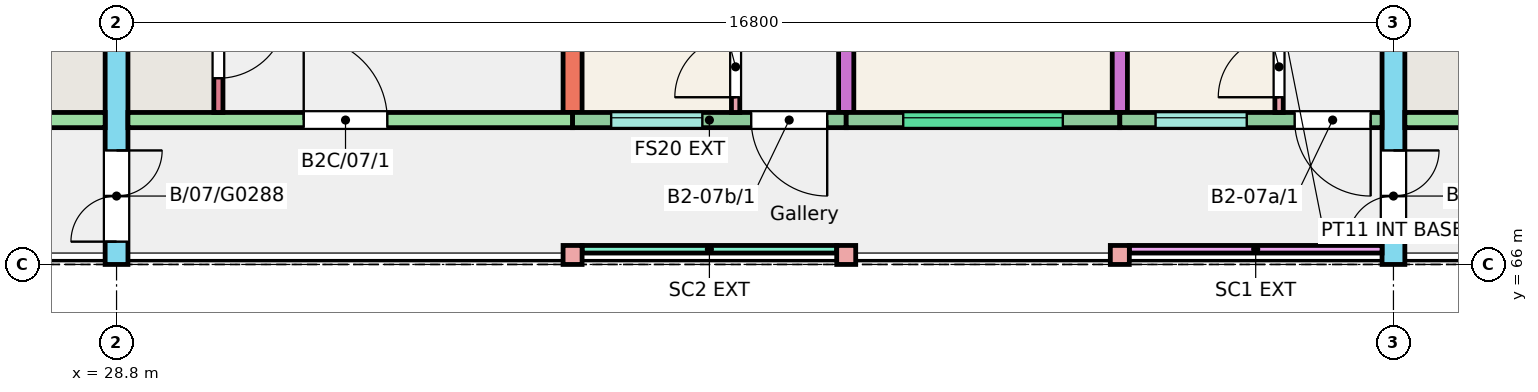
"""IFC4 building model, lengths in metres.
Left out: names, types, materials, properties, quantities, classifications, styles, units other than length and angle.
Written with IfcOpenShell. Run it as: python <this file> out.ifc"""

import sys

from ifc_helpers import new_model, si_unit, direction, frame, frame_2d, origin, origin_2d, place, context, subcontext, project, spatial, rectangle, extrude, element, fill, save


model = new_model("IFC4")
c1 = context("Model", 3, precision=1e-05, world=origin(), true_north=direction((0.0, 1.0)))
c2 = subcontext(c1, "Body", "Model", "MODEL_VIEW")
j1 = project(units=[si_unit("LENGTHUNIT", "METRE"), si_unit("PLANEANGLEUNIT", "RADIAN")], contexts=[c1])
p1 = place(None, origin())
s1 = spatial("IfcSite", under=j1, at=p1, CompositionType="ELEMENT")
p2 = place(p1, origin())
s2 = spatial("IfcBuilding", under=s1, at=p2, CompositionType="ELEMENT")
p3 = place(p2, frame((0.0, 0.0, 21.0)))
s3 = spatial("IfcBuildingStorey", under=s2, at=p3, CompositionType="ELEMENT", Elevation=21.0)
p4 = place(p3, frame((28.8, 66.0, 0.0), z_axis=(0.0, 0.0, 1.0), x_axis=(0.0, 1.0, 0.0)))
e1 = element("IfcWall", 1, at=p4, inside=s3, PredefinedType="SHEAR", context=c2, shape_type="SweptSolid", body=[
    extrude(rectangle(XDim=11.0, YDim=0.3, at=frame_2d((5.5, 0.0))), origin(), (0.0, 0.0, 1.0), 3.0),
])
p5 = place(p4, frame((0.3, 0.0, 0.0)))
e2 = element("IfcOpeningElement", 2, at=p5, cuts=e1, PredefinedType="OPENING", context=c2, shape_type="SweptSolid", body=[
    extrude(rectangle(XDim=1.2, YDim=2.1, at=frame_2d((0.6, 1.05))), frame((0.0, 0.16, 0.0), z_axis=(0.0, -1.0, 0.0), x_axis=(1.0, 0.0, 0.0)), (0.0, 0.0, 1.0), 0.32),
])
p6 = place(p3, frame((34.8, 68.0, 0.0), z_axis=(0.0, 0.0, 1.0), x_axis=(0.0, 1.0, 0.0)))
e3 = element("IfcWall", 3, at=p6, inside=s3, PredefinedType="SHEAR", context=c2, shape_type="SweptSolid", body=[
    extrude(rectangle(XDim=9.0, YDim=0.25, at=frame_2d((4.5, 0.0))), origin(), (0.0, 0.0, 1.0), 3.0),
])
p7 = place(p3, frame((38.4, 68.0, 0.0), z_axis=(0.0, 0.0, 1.0), x_axis=(0.0, 1.0, 0.0)))
e4 = element("IfcWall", 4, at=p7, inside=s3, PredefinedType="SHEAR", context=c2, shape_type="SweptSolid", body=[
    extrude(rectangle(XDim=9.0, YDim=0.2, at=frame_2d((4.5, 0.0))), origin(), (0.0, 0.0, 1.0), 3.0),
])
p8 = place(p7, frame((2.4, 0.0, 0.0)))
e5 = element("IfcOpeningElement", 5, at=p8, cuts=e4, PredefinedType="OPENING", context=c2, shape_type="SweptSolid", body=[
    extrude(rectangle(XDim=1.2, YDim=2.1, at=frame_2d((0.6, 1.05))), frame((0.0, 0.11, 0.0), z_axis=(0.0, -1.0, 0.0), x_axis=(1.0, 0.0, 0.0)), (0.0, 0.0, 1.0), 0.22),
])
p9 = place(p7, frame((6.4, 0.0, 0.0)))
e6 = element("IfcOpeningElement", 6, at=p9, cuts=e4, PredefinedType="OPENING", context=c2, shape_type="SweptSolid", body=[
    extrude(rectangle(XDim=1.2, YDim=2.1, at=frame_2d((0.6, 1.05))), frame((0.0, 0.11, 0.0), z_axis=(0.0, -1.0, 0.0), x_axis=(1.0, 0.0, 0.0)), (0.0, 0.0, 1.0), 0.22),
])
p10 = place(p3, frame((42.0, 68.0, 0.0), z_axis=(0.0, 0.0, 1.0), x_axis=(0.0, 1.0, 0.0)))
e7 = element("IfcWall", 7, at=p10, inside=s3, PredefinedType="SHEAR", context=c2, shape_type="SweptSolid", body=[
    extrude(rectangle(XDim=9.0, YDim=0.2, at=frame_2d((4.5, 0.0))), origin(), (0.0, 0.0, 1.0), 3.0),
])
p11 = place(p3, frame((45.6, 66.0, 0.0), z_axis=(0.0, 0.0, 1.0), x_axis=(0.0, 1.0, 0.0)))
e8 = element("IfcWall", 8, at=p11, inside=s3, PredefinedType="SHEAR", context=c2, shape_type="SweptSolid", body=[
    extrude(rectangle(XDim=11.0, YDim=0.3, at=frame_2d((5.5, 0.0))), origin(), (0.0, 0.0, 1.0), 3.0),
])
p12 = place(p11, frame((0.3, 0.0, 0.0)))
e9 = element("IfcOpeningElement", 9, at=p12, cuts=e8, PredefinedType="OPENING", context=c2, shape_type="SweptSolid", body=[
    extrude(rectangle(XDim=1.2, YDim=2.1, at=frame_2d((0.6, 1.05))), frame((0.0, 0.16, 0.0), z_axis=(0.0, -1.0, 0.0), x_axis=(1.0, 0.0, 0.0)), (0.0, 0.0, 1.0), 0.32),
])
p13 = place(p3, frame((22.8, 67.9, 0.0), z_axis=(0.0, 0.0, 1.0), x_axis=(1.0, 0.0, 0.0)))
e10 = element("IfcWall", 10, at=p13, inside=s3, PredefinedType="SHEAR", context=c2, shape_type="SweptSolid", body=[
    extrude(rectangle(XDim=5.85, YDim=0.2, at=frame_2d((2.925, 0.0))), origin(), (0.0, 0.0, 1.0), 3.0),
])
p14 = place(p13, frame((2.438, 0.0, 0.0)))
e11 = element("IfcOpeningElement", 11, at=p14, cuts=e10, PredefinedType="OPENING", context=c2, shape_type="SweptSolid", body=[
    extrude(rectangle(XDim=1.1, YDim=2.1, at=frame_2d((0.55, 1.05))), frame((0.0, 0.11, 0.0), z_axis=(0.0, -1.0, 0.0), x_axis=(1.0, 0.0, 0.0)), (0.0, 0.0, 1.0), 0.22),
])
p15 = place(p3, frame((28.95, 67.9, 0.0), z_axis=(0.0, 0.0, 1.0), x_axis=(1.0, 0.0, 0.0)))
e12 = element("IfcWall", 12, at=p15, inside=s3, PredefinedType="SHEAR", context=c2, shape_type="SweptSolid", body=[
    extrude(rectangle(XDim=5.85, YDim=0.2, at=frame_2d((2.925, 0.0))), origin(), (0.0, 0.0, 1.0), 3.0),
])
p16 = place(p15, frame((2.312, 0.0, 0.0)))
e13 = element("IfcOpeningElement", 13, at=p16, cuts=e12, PredefinedType="OPENING", context=c2, shape_type="SweptSolid", body=[
    extrude(rectangle(XDim=1.1, YDim=2.1, at=frame_2d((0.55, 1.05))), frame((0.0, 0.11, 0.0), z_axis=(0.0, -1.0, 0.0), x_axis=(1.0, 0.0, 0.0)), (0.0, 0.0, 1.0), 0.22),
])
p17 = place(p3, frame((30.14, 68.0, 0.0), z_axis=(0.0, 0.0, 1.0), x_axis=(0.0, 1.0, 0.0)))
e14 = element("IfcWall", 14, at=p17, inside=s3, PredefinedType="SHEAR", context=c2, shape_type="SweptSolid", body=[
    extrude(rectangle(XDim=1.72, YDim=0.12, at=frame_2d((0.86, 0.0))), origin(), (0.0, 0.0, 1.0), 3.0),
])
p18 = place(p17, frame((0.45, 0.0, 0.0)))
e15 = element("IfcOpeningElement", 15, at=p18, cuts=e14, PredefinedType="OPENING", context=c2, shape_type="SweptSolid", body=[
    extrude(rectangle(XDim=0.9, YDim=2.1, at=frame_2d((0.45, 1.05))), frame((0.0, 0.07, 0.0), z_axis=(0.0, -1.0, 0.0), x_axis=(1.0, 0.0, 0.0)), (0.0, 0.0, 1.0), 0.14),
])
p19 = place(p3, frame((34.8, 67.9, 0.0), z_axis=(0.0, 0.0, 1.0), x_axis=(1.0, 0.0, 0.0)))
e16 = element("IfcWall", 16, at=p19, inside=s3, PredefinedType="SOLIDWALL", context=c2, shape_type="SweptSolid", body=[
    extrude(rectangle(XDim=3.6, YDim=0.2, at=frame_2d((1.8, 0.0))), origin(), (0.0, 0.0, 1.0), 3.0),
])
p20 = place(p19, frame((0.508, 0.0, 1.1)))
e17 = element("IfcOpeningElement", 17, at=p20, cuts=e16, PredefinedType="OPENING", context=c2, shape_type="SweptSolid", body=[
    extrude(rectangle(XDim=1.2, YDim=1.3, at=frame_2d((0.6, 0.65))), frame((0.0, 0.11, 0.0), z_axis=(0.0, -1.0, 0.0), x_axis=(1.0, 0.0, 0.0)), (0.0, 0.0, 1.0), 0.22),
])
p21 = place(p19, frame((2.35, 0.0, 0.0)))
e18 = element("IfcOpeningElement", 18, at=p21, cuts=e16, PredefinedType="OPENING", context=c2, shape_type="SweptSolid", body=[
    extrude(rectangle(XDim=1.0, YDim=2.1, at=frame_2d((0.5, 1.05))), frame((0.0, 0.11, 0.0), z_axis=(0.0, -1.0, 0.0), x_axis=(1.0, 0.0, 0.0)), (0.0, 0.0, 1.0), 0.22),
])
p22 = place(p3, frame((38.4, 67.9, 0.0), z_axis=(0.0, 0.0, 1.0), x_axis=(1.0, 0.0, 0.0)))
e19 = element("IfcWall", 19, at=p22, inside=s3, PredefinedType="SOLIDWALL", context=c2, shape_type="SweptSolid", body=[
    extrude(rectangle(XDim=3.6, YDim=0.2, at=frame_2d((1.8, 0.0))), origin(), (0.0, 0.0, 1.0), 3.0),
])
p23 = place(p22, frame((0.75, 0.0, 1.2)))
e20 = element("IfcOpeningElement", 20, at=p23, cuts=e19, PredefinedType="OPENING", context=c2, shape_type="SweptSolid", body=[
    extrude(rectangle(XDim=2.1, YDim=1.2, at=frame_2d((1.05, 0.6))), frame((0.0, 0.11, 0.0), z_axis=(0.0, -1.0, 0.0), x_axis=(1.0, 0.0, 0.0)), (0.0, 0.0, 1.0), 0.22),
])
p24 = place(p3, frame((42.0, 67.9, 0.0), z_axis=(0.0, 0.0, 1.0), x_axis=(1.0, 0.0, 0.0)))
e21 = element("IfcWall", 21, at=p24, inside=s3, PredefinedType="SOLIDWALL", context=c2, shape_type="SweptSolid", body=[
    extrude(rectangle(XDim=3.45, YDim=0.2, at=frame_2d((1.725, 0.0))), origin(), (0.0, 0.0, 1.0), 3.0),
])
p25 = place(p24, frame((0.47, 0.0, 1.1)))
e22 = element("IfcOpeningElement", 22, at=p25, cuts=e21, PredefinedType="OPENING", context=c2, shape_type="SweptSolid", body=[
    extrude(rectangle(XDim=1.2, YDim=1.3, at=frame_2d((0.6, 0.65))), frame((0.0, 0.11, 0.0), z_axis=(0.0, -1.0, 0.0), x_axis=(1.0, 0.0, 0.0)), (0.0, 0.0, 1.0), 0.22),
])
p26 = place(p24, frame((2.3, 0.0, 0.0)))
e23 = element("IfcOpeningElement", 23, at=p26, cuts=e21, PredefinedType="OPENING", context=c2, shape_type="SweptSolid", body=[
    extrude(rectangle(XDim=1.0, YDim=2.1, at=frame_2d((0.5, 1.05))), frame((0.0, 0.11, 0.0), z_axis=(0.0, -1.0, 0.0), x_axis=(1.0, 0.0, 0.0)), (0.0, 0.0, 1.0), 0.22),
])
p27 = place(p3, frame((45.75, 67.9, 0.0), z_axis=(0.0, 0.0, 1.0), x_axis=(1.0, 0.0, 0.0)))
e24 = element("IfcWall", 24, at=p27, inside=s3, PredefinedType="SHEAR", context=c2, shape_type="SweptSolid", body=[
    extrude(rectangle(XDim=5.85, YDim=0.2, at=frame_2d((2.925, 0.0))), origin(), (0.0, 0.0, 1.0), 3.0),
])
p28 = place(p27, frame((2.312, 0.0, 0.0)))
e25 = element("IfcOpeningElement", 25, at=p28, cuts=e24, PredefinedType="OPENING", context=c2, shape_type="SweptSolid", body=[
    extrude(rectangle(XDim=1.1, YDim=2.1, at=frame_2d((0.55, 1.05))), frame((0.0, 0.11, 0.0), z_axis=(0.0, -1.0, 0.0), x_axis=(1.0, 0.0, 0.0)), (0.0, 0.0, 1.0), 0.22),
])
for number, where, z_axis, x_axis in (
    (26, (34.8, 66.125, 0.0), (0.0, 0.0, 1.0), (1.0, 0.0, 0.0)),
    (27, (38.4, 66.125, 0.0), (0.0, 0.0, 1.0), (1.0, 0.0, 0.0)),
    (28, (42.0, 66.125, 0.0), (0.0, 0.0, 1.0), (1.0, 0.0, 0.0)),
):
    element("IfcColumn", number, at=place(p3, frame(where, z_axis=z_axis, x_axis=x_axis)), inside=s3, PredefinedType="COLUMN", context=c2, shape_type="SweptSolid", body=[
        extrude(rectangle(XDim=0.25, YDim=0.25, at=origin_2d()), origin(), (0.0, 0.0, 1.0), 3.0),
    ])
p29 = place(p3, frame((34.925, 66.2, 0.0), z_axis=(0.0, 0.0, 1.0), x_axis=(1.0, 0.0, 0.0)))
e29 = element("IfcWall", 29, at=p29, inside=s3, PredefinedType="SOLIDWALL", context=c2, shape_type="SweptSolid", body=[
    extrude(rectangle(XDim=3.35, YDim=0.1, at=frame_2d((1.675, 0.0))), origin(), (0.0, 0.0, 1.0), 2.45),
])
p30 = place(p3, frame((42.125, 66.2, 0.0), z_axis=(0.0, 0.0, 1.0), x_axis=(1.0, 0.0, 0.0)))
e30 = element("IfcWall", 30, at=p30, inside=s3, PredefinedType="SOLIDWALL", context=c2, shape_type="SweptSolid", body=[
    extrude(rectangle(XDim=3.325, YDim=0.1, at=frame_2d((1.663, 0.0))), origin(), (0.0, 0.0, 1.0), 2.45),
])
p31 = place(p3, frame((44.095, 68.0, 0.0), z_axis=(0.0, 0.0, 1.0), x_axis=(0.0, 1.0, 0.0)))
e31 = element("IfcWall", 31, at=p31, inside=s3, PredefinedType="PARTITIONING", context=c2, shape_type="SweptSolid", body=[
    extrude(rectangle(XDim=4.7, YDim=0.11, at=frame_2d((2.35, 0.0))), origin(), (0.0, 0.0, 1.0), 2.75),
])
p32 = place(p31, frame((0.2, 0.0, 0.0)))
e32 = element("IfcOpeningElement", 32, at=p32, cuts=e31, PredefinedType="OPENING", context=c2, shape_type="SweptSolid", body=[
    extrude(rectangle(XDim=0.8, YDim=2.1, at=frame_2d((0.4, 1.05))), frame((0.0, 0.065, 0.0), z_axis=(0.0, -1.0, 0.0), x_axis=(1.0, 0.0, 0.0)), (0.0, 0.0, 1.0), 0.13),
])
p33 = place(p31, frame((3.75, 0.0, 0.0)))
e33 = element("IfcOpeningElement", 33, at=p33, cuts=e31, PredefinedType="OPENING", context=c2, shape_type="SweptSolid", body=[
    extrude(rectangle(XDim=0.8, YDim=2.1, at=frame_2d((0.4, 1.05))), frame((0.0, 0.065, 0.0), z_axis=(0.0, -1.0, 0.0), x_axis=(1.0, 0.0, 0.0)), (0.0, 0.0, 1.0), 0.13),
])
p34 = place(p3, frame((36.945, 68.0, 0.0), z_axis=(0.0, 0.0, 1.0), x_axis=(0.0, 1.0, 0.0)))
e34 = element("IfcWall", 34, at=p34, inside=s3, PredefinedType="PARTITIONING", context=c2, shape_type="SweptSolid", body=[
    extrude(rectangle(XDim=4.7, YDim=0.11, at=frame_2d((2.35, 0.0))), origin(), (0.0, 0.0, 1.0), 2.8),
])
p35 = place(p34, frame((0.2, 0.0, 0.0)))
e35 = element("IfcOpeningElement", 35, at=p35, cuts=e34, PredefinedType="OPENING", context=c2, shape_type="SweptSolid", body=[
    extrude(rectangle(XDim=0.8, YDim=2.1, at=frame_2d((0.4, 1.05))), frame((0.0, 0.065, 0.0), z_axis=(0.0, -1.0, 0.0), x_axis=(1.0, 0.0, 0.0)), (0.0, 0.0, 1.0), 0.13),
])
p36 = place(p34, frame((3.75, 0.0, 0.0)))
e36 = element("IfcOpeningElement", 36, at=p36, cuts=e34, PredefinedType="OPENING", context=c2, shape_type="SweptSolid", body=[
    extrude(rectangle(XDim=0.8, YDim=2.1, at=frame_2d((0.4, 1.05))), frame((0.0, 0.065, 0.0), z_axis=(0.0, -1.0, 0.0), x_axis=(1.0, 0.0, 0.0)), (0.0, 0.0, 1.0), 0.13),
])
p37 = place(p25, origin())
e37 = element("IfcWindow", 37, at=p37, inside=s3, PartitioningType="SINGLE_PANEL", PredefinedType="WINDOW", context=c2, shape_type="SweptSolid", body=[
    extrude(rectangle(XDim=1.2, YDim=1.3, at=frame_2d((0.6, 0.65))), frame((0.0, 0.06, 0.0), z_axis=(0.0, -1.0, 0.0), x_axis=(1.0, 0.0, 0.0)), (0.0, 0.0, 1.0), 0.06),
])
fill(e22, e37)
p38 = place(p23, origin())
e38 = element("IfcWindow", 38, at=p38, inside=s3, PartitioningType="SINGLE_PANEL", PredefinedType="WINDOW", context=c2, shape_type="SweptSolid", body=[
    extrude(rectangle(XDim=2.1, YDim=1.2, at=frame_2d((1.05, 0.6))), frame((0.0, 0.06, 0.0), z_axis=(0.0, -1.0, 0.0), x_axis=(1.0, 0.0, 0.0)), (0.0, 0.0, 1.0), 0.06),
])
fill(e20, e38)
p39 = place(p20, origin())
e39 = element("IfcWindow", 39, at=p39, inside=s3, PartitioningType="SINGLE_PANEL", PredefinedType="WINDOW", context=c2, shape_type="SweptSolid", body=[
    extrude(rectangle(XDim=1.2, YDim=1.3, at=frame_2d((0.6, 0.65))), frame((0.0, 0.06, 0.0), z_axis=(0.0, -1.0, 0.0), x_axis=(1.0, 0.0, 0.0)), (0.0, 0.0, 1.0), 0.06),
])
fill(e17, e39)
p40 = place(p26, origin())
e40 = element("IfcDoor", 40, at=p40, inside=s3, OperationType="SINGLE_SWING_RIGHT", PredefinedType="DOOR", context=c2, shape_type="SweptSolid", body=[
    extrude(rectangle(XDim=1.0, YDim=2.1, at=frame_2d((0.5, 1.05))), frame((0.0, 0.025, 0.0), z_axis=(0.0, -1.0, 0.0), x_axis=(1.0, 0.0, 0.0)), (0.0, 0.0, 1.0), 0.05),
])
fill(e23, e40)
p41 = place(p32, origin())
e41 = element("IfcDoor", 41, at=p41, inside=s3, OperationType="SINGLE_SWING_LEFT", PredefinedType="DOOR", context=c2, shape_type="SweptSolid", body=[
    extrude(rectangle(XDim=0.8, YDim=2.1, at=frame_2d((0.4, 1.05))), frame((0.0, 0.025, 0.0), z_axis=(0.0, -1.0, 0.0), x_axis=(1.0, 0.0, 0.0)), (0.0, 0.0, 1.0), 0.05),
])
fill(e32, e41)
p42 = place(p21, origin())
e42 = element("IfcDoor", 42, at=p42, inside=s3, OperationType="SINGLE_SWING_RIGHT", PredefinedType="DOOR", context=c2, shape_type="SweptSolid", body=[
    extrude(rectangle(XDim=1.0, YDim=2.1, at=frame_2d((0.5, 1.05))), frame((0.0, 0.025, 0.0), z_axis=(0.0, -1.0, 0.0), x_axis=(1.0, 0.0, 0.0)), (0.0, 0.0, 1.0), 0.05),
])
fill(e18, e42)
p43 = place(p35, origin())
e43 = element("IfcDoor", 43, at=p43, inside=s3, OperationType="SINGLE_SWING_LEFT", PredefinedType="DOOR", context=c2, shape_type="SweptSolid", body=[
    extrude(rectangle(XDim=0.8, YDim=2.1, at=frame_2d((0.4, 1.05))), frame((0.0, 0.025, 0.0), z_axis=(0.0, -1.0, 0.0), x_axis=(1.0, 0.0, 0.0)), (0.0, 0.0, 1.0), 0.05),
])
fill(e35, e43)
p44 = place(p16, origin())
e44 = element("IfcDoor", 44, at=p44, inside=s3, OperationType="SINGLE_SWING_LEFT", PredefinedType="DOOR", context=c2, shape_type="SweptSolid", body=[
    extrude(rectangle(XDim=1.1, YDim=2.1, at=frame_2d((0.55, 1.05))), frame((0.0, 0.025, 0.0), z_axis=(0.0, -1.0, 0.0), x_axis=(1.0, 0.0, 0.0)), (0.0, 0.0, 1.0), 0.05),
])
fill(e13, e44)
p45 = place(p18, origin())
e45 = element("IfcDoor", 45, at=p45, inside=s3, OperationType="SINGLE_SWING_RIGHT", PredefinedType="DOOR", context=c2, shape_type="SweptSolid", body=[
    extrude(rectangle(XDim=0.9, YDim=2.1, at=frame_2d((0.45, 1.05))), frame((0.0, 0.025, 0.0), z_axis=(0.0, -1.0, 0.0), x_axis=(1.0, 0.0, 0.0)), (0.0, 0.0, 1.0), 0.05),
])
fill(e15, e45)
p46 = place(p5, origin())
e46 = element("IfcDoor", 46, at=p46, inside=s3, OperationType="DOUBLE_DOOR_SINGLE_SWING", PredefinedType="DOOR", context=c2, shape_type="SweptSolid", body=[
    extrude(rectangle(XDim=1.2, YDim=2.1, at=frame_2d((0.6, 1.05))), frame((0.0, 0.025, 0.0), z_axis=(0.0, -1.0, 0.0), x_axis=(1.0, 0.0, 0.0)), (0.0, 0.0, 1.0), 0.05),
])
fill(e2, e46)
p47 = place(p12, origin())
e47 = element("IfcDoor", 47, at=p47, inside=s3, OperationType="DOUBLE_DOOR_SINGLE_SWING", PredefinedType="DOOR", context=c2, shape_type="SweptSolid", body=[
    extrude(rectangle(XDim=1.2, YDim=2.1, at=frame_2d((0.6, 1.05))), frame((0.0, 0.025, 0.0), z_axis=(0.0, -1.0, 0.0), x_axis=(1.0, 0.0, 0.0)), (0.0, 0.0, 1.0), 0.05),
])
fill(e9, e47)
save(model, sys.argv[1])
